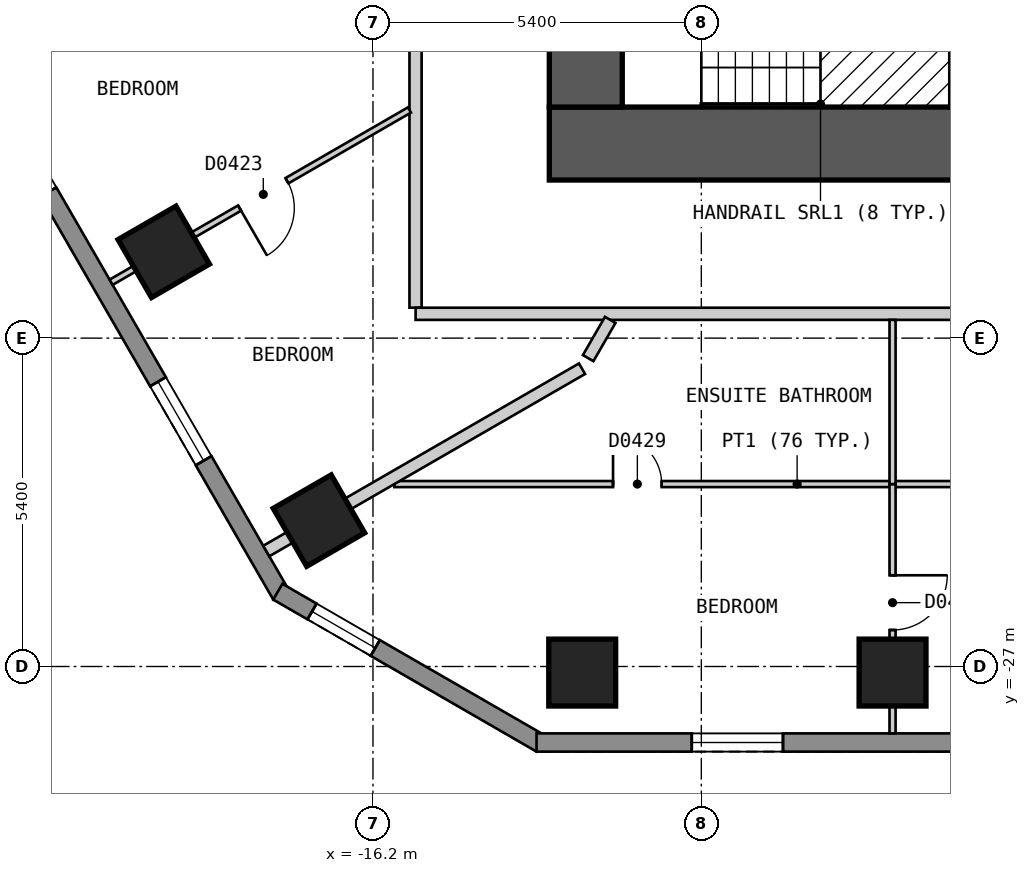
"""IFC4 building model, lengths in metres.
Left out: names, types, materials, properties, quantities, classifications, styles, units other than length and angle.
Written with IfcOpenShell. Run it as: python <this file> out.ifc"""

import sys

from ifc_helpers import new_model, si_unit, direction, frame, frame_2d, origin, origin_2d, place, context, subcontext, project, spatial, polyline, rectangle, outline, extrude, element, fill, save


model = new_model("IFC4")
c1 = context("Model", 3, precision=1e-05, world=origin(), true_north=direction((0.0, 1.0)))
c2 = subcontext(c1, "Body", "Model", "MODEL_VIEW")
j1 = project(units=[si_unit("LENGTHUNIT", "METRE"), si_unit("PLANEANGLEUNIT", "RADIAN")], contexts=[c1])
p1 = place(None, origin())
s1 = spatial("IfcSite", under=j1, at=p1, CompositionType="ELEMENT")
p2 = place(p1, origin())
s2 = spatial("IfcBuilding", under=s1, at=p2, CompositionType="ELEMENT")
p3 = place(p2, frame((0.0, 0.0, 32.4)))
s3 = spatial("IfcBuildingStorey", under=s2, at=p3, CompositionType="ELEMENT", Elevation=32.4)
for number, where, z_axis, x_axis in (
    (1, (-19.641, -20.181, 0.0), (0.0, 0.0, 1.0), (0.5, -0.866, 0.0)),
    (2, (-17.089, -24.601, 0.0), (0.0, 0.0, 1.0), (0.5, -0.866, 0.0)),
    (3, (-12.759, -27.1, 0.0), (0.0, 0.0, 1.0), (1.0, 0.0, 0.0)),
    (4, (-7.655, -27.1, 0.0), (0.0, 0.0, 1.0), (1.0, 0.0, 0.0)),
):
    element("IfcColumn", number, at=place(p3, frame(where, z_axis=z_axis, x_axis=x_axis)), inside=s3, PredefinedType="COLUMN", context=c2, shape_type="SweptSolid", body=[
        extrude(rectangle(XDim=1.1, YDim=1.1, at=origin_2d()), origin(), (0.0, 0.0, 1.0), 3.0),
    ])
p4 = place(p3, frame((-13.3, -18.4, 0.0), z_axis=(0.0, 0.0, 1.0), x_axis=(1.0, 0.0, 0.0)))
e5 = element("IfcWall", 5, at=p4, inside=s3, PredefinedType="SHEAR", context=c2, shape_type="SweptSolid", body=[
    extrude(rectangle(XDim=26.6, YDim=1.2, at=frame_2d((13.3, 0.0))), origin(), (0.0, 0.0, 1.0), 2.7),
])
p5 = place(p3, frame((-12.7, -17.8, 0.0), z_axis=(0.0, 0.0, 1.0), x_axis=(0.0, 1.0, 0.0)))
e6 = element("IfcWall", 6, at=p5, inside=s3, PredefinedType="SHEAR", context=c2, shape_type="SweptSolid", body=[
    extrude(rectangle(XDim=11.6, YDim=1.2, at=frame_2d((5.8, 0.0))), origin(), (0.0, 0.0, 1.0), 2.7),
])
p6 = place(p5, frame((3.6, 0.0, 0.0)))
e7 = element("IfcOpeningElement", 7, at=p6, cuts=e6, PredefinedType="OPENING", context=c2, shape_type="SweptSolid", body=[
    extrude(rectangle(XDim=1.2, YDim=2.1, at=frame_2d((0.6, 1.05))), frame((0.0, 0.61, 0.0), z_axis=(0.0, -1.0, 0.0), x_axis=(1.0, 0.0, 0.0)), (0.0, 0.0, 1.0), 1.22),
])
p7 = place(p3, frame((-31.22, -2.425, 0.0), z_axis=(0.0, 0.0, 1.0), x_axis=(0.500001938803, -0.866024284413, 0.0)))
e8 = element("IfcWall", 8, at=p7, inside=s3, PredefinedType="SOLIDWALL", context=c2, shape_type="SweptSolid", body=[
    extrude(outline(polyline([(0.0, -0.15), (27.02, -0.15), (26.94, 0.15), (0.08, 0.15), (0.0, -0.15)])), origin(), (0.0, 0.0, 1.0), 2.7),
])
p8 = place(p7, frame((2.553, 0.0, 0.15)))
e9 = element("IfcOpeningElement", 9, at=p8, cuts=e8, PredefinedType="OPENING", context=c2, shape_type="SweptSolid", body=[
    extrude(rectangle(XDim=1.5, YDim=2.1, at=frame_2d((0.75, 1.05))), frame((0.0, 0.16, 0.0), z_axis=(0.0, -1.0, 0.0), x_axis=(1.0, 0.0, 0.0)), (0.0, 0.0, 1.0), 0.32),
])
p9 = place(p7, frame((7.657, 0.0, 0.15)))
e10 = element("IfcOpeningElement", 10, at=p9, cuts=e8, PredefinedType="OPENING", context=c2, shape_type="SweptSolid", body=[
    extrude(rectangle(XDim=1.5, YDim=2.1, at=frame_2d((0.75, 1.05))), frame((0.0, 0.16, 0.0), z_axis=(0.0, -1.0, 0.0), x_axis=(1.0, 0.0, 0.0)), (0.0, 0.0, 1.0), 0.32),
])
p10 = place(p7, frame((12.761, 0.0, 0.15)))
e11 = element("IfcOpeningElement", 11, at=p10, cuts=e8, PredefinedType="OPENING", context=c2, shape_type="SweptSolid", body=[
    extrude(rectangle(XDim=1.5, YDim=2.1, at=frame_2d((0.75, 1.05))), frame((0.0, 0.16, 0.0), z_axis=(0.0, -1.0, 0.0), x_axis=(1.0, 0.0, 0.0)), (0.0, 0.0, 1.0), 0.32),
])
p11 = place(p7, frame((17.865, 0.0, 0.15)))
e12 = element("IfcOpeningElement", 12, at=p11, cuts=e8, PredefinedType="OPENING", context=c2, shape_type="SweptSolid", body=[
    extrude(rectangle(XDim=1.5, YDim=2.1, at=frame_2d((0.75, 1.05))), frame((0.0, 0.16, 0.0), z_axis=(0.0, -1.0, 0.0), x_axis=(1.0, 0.0, 0.0)), (0.0, 0.0, 1.0), 0.32),
])
p12 = place(p7, frame((22.969, 0.0, 0.15)))
e13 = element("IfcOpeningElement", 13, at=p12, cuts=e8, PredefinedType="OPENING", context=c2, shape_type="SweptSolid", body=[
    extrude(rectangle(XDim=1.5, YDim=2.1, at=frame_2d((0.75, 1.05))), frame((0.0, 0.16, 0.0), z_axis=(0.0, -1.0, 0.0), x_axis=(1.0, 0.0, 0.0)), (0.0, 0.0, 1.0), 0.32),
])
p13 = place(p3, frame((-17.765, -25.77, 0.0), z_axis=(0.0, 0.0, 1.0), x_axis=(0.866010750942, -0.50002537861, 0.0)))
e14 = element("IfcWall", 14, at=p13, inside=s3, PredefinedType="SOLIDWALL", context=c2, shape_type="SweptSolid", body=[
    extrude(outline(polyline([(0.0, -0.15), (5.0, -0.15), (4.919, 0.15), (0.08, 0.15), (0.0, -0.15)])), origin(), (0.0, 0.0, 1.0), 2.7),
])
p14 = place(p13, frame((0.65, 0.0, 0.15)))
e15 = element("IfcOpeningElement", 15, at=p14, cuts=e14, PredefinedType="OPENING", context=c2, shape_type="SweptSolid", body=[
    extrude(rectangle(XDim=1.2, YDim=2.1, at=frame_2d((0.6, 1.05))), frame((0.0, 0.16, 0.0), z_axis=(0.0, -1.0, 0.0), x_axis=(1.0, 0.0, 0.0)), (0.0, 0.0, 1.0), 0.32),
])
p15 = place(p3, frame((-13.51, -28.25, 0.0), z_axis=(0.0, 0.0, 1.0), x_axis=(1.0, 0.0, 0.0)))
e16 = element("IfcWall", 16, at=p15, inside=s3, PredefinedType="SOLIDWALL", context=c2, shape_type="SweptSolid", body=[
    extrude(outline(polyline([(0.0, -0.15), (27.02, -0.15), (26.94, 0.15), (0.08, 0.15), (0.0, -0.15)])), origin(), (0.0, 0.0, 1.0), 2.7),
])
p16 = place(p15, frame((2.553, 0.0, 0.15)))
e17 = element("IfcOpeningElement", 17, at=p16, cuts=e16, PredefinedType="OPENING", context=c2, shape_type="SweptSolid", body=[
    extrude(rectangle(XDim=1.5, YDim=2.1, at=frame_2d((0.75, 1.05))), frame((0.0, 0.16, 0.0), z_axis=(0.0, -1.0, 0.0), x_axis=(1.0, 0.0, 0.0)), (0.0, 0.0, 1.0), 0.32),
])
p17 = place(p15, frame((7.657, 0.0, 0.15)))
e18 = element("IfcOpeningElement", 18, at=p17, cuts=e16, PredefinedType="OPENING", context=c2, shape_type="SweptSolid", body=[
    extrude(rectangle(XDim=1.5, YDim=2.1, at=frame_2d((0.75, 1.05))), frame((0.0, 0.16, 0.0), z_axis=(0.0, -1.0, 0.0), x_axis=(1.0, 0.0, 0.0)), (0.0, 0.0, 1.0), 0.32),
])
p18 = place(p15, frame((12.761, 0.0, 0.15)))
e19 = element("IfcOpeningElement", 19, at=p18, cuts=e16, PredefinedType="OPENING", context=c2, shape_type="SweptSolid", body=[
    extrude(rectangle(XDim=1.5, YDim=2.1, at=frame_2d((0.75, 1.05))), frame((0.0, 0.16, 0.0), z_axis=(0.0, -1.0, 0.0), x_axis=(1.0, 0.0, 0.0)), (0.0, 0.0, 1.0), 0.32),
])
p19 = place(p15, frame((17.865, 0.0, 0.15)))
e20 = element("IfcOpeningElement", 20, at=p19, cuts=e16, PredefinedType="OPENING", context=c2, shape_type="SweptSolid", body=[
    extrude(rectangle(XDim=1.5, YDim=2.1, at=frame_2d((0.75, 1.05))), frame((0.0, 0.16, 0.0), z_axis=(0.0, -1.0, 0.0), x_axis=(1.0, 0.0, 0.0)), (0.0, 0.0, 1.0), 0.32),
])
p20 = place(p15, frame((22.969, 0.0, 0.15)))
e21 = element("IfcOpeningElement", 21, at=p20, cuts=e16, PredefinedType="OPENING", context=c2, shape_type="SweptSolid", body=[
    extrude(rectangle(XDim=1.5, YDim=2.1, at=frame_2d((0.75, 1.05))), frame((0.0, 0.16, 0.0), z_axis=(0.0, -1.0, 0.0), x_axis=(1.0, 0.0, 0.0)), (0.0, 0.0, 1.0), 0.32),
])
p21 = place(p3, frame((-15.5, -16.5, 0.0), z_axis=(0.0, 0.0, 1.0), x_axis=(0.0, -1.0, 0.0)))
e22 = element("IfcWall", 22, at=p21, inside=s3, PredefinedType="PARTITIONING", context=c2, shape_type="SweptSolid", body=[
    extrude(rectangle(XDim=4.599, YDim=0.2, at=frame_2d((2.3, 0.0))), origin(), (0.0, 0.0, 1.0), 2.7),
])
p22 = place(p3, frame((-15.499, -21.2, 0.0), z_axis=(0.0, 0.0, 1.0), x_axis=(1.0, 0.0, 0.0)))
e23 = element("IfcWall", 23, at=p22, inside=s3, PredefinedType="PARTITIONING", context=c2, shape_type="SweptSolid", body=[
    extrude(rectangle(XDim=30.898, YDim=0.2, at=frame_2d((15.449, 0.0))), origin(), (0.0, 0.0, 1.0), 2.7),
])
p23 = place(p22, frame((15.0, 0.0, 0.0)))
e24 = element("IfcOpeningElement", 24, at=p23, cuts=e23, PredefinedType="OPENING", context=c2, shape_type="SweptSolid", body=[
    extrude(rectangle(XDim=1.0, YDim=2.1, at=frame_2d((0.5, 1.05))), frame((0.0, 0.11, 0.0), z_axis=(0.0, -1.0, 0.0), x_axis=(1.0, 0.0, 0.0)), (0.0, 0.0, 1.0), 0.22),
])
p24 = place(p22, frame((20.104, 0.0, 0.0)))
e25 = element("IfcOpeningElement", 25, at=p24, cuts=e23, PredefinedType="OPENING", context=c2, shape_type="SweptSolid", body=[
    extrude(rectangle(XDim=1.0, YDim=2.1, at=frame_2d((0.5, 1.05))), frame((0.0, 0.11, 0.0), z_axis=(0.0, -1.0, 0.0), x_axis=(1.0, 0.0, 0.0)), (0.0, 0.0, 1.0), 0.22),
])
p25 = place(p3, frame((-15.848, -24.0, 0.0), z_axis=(0.0, 0.0, 1.0), x_axis=(1.0, 0.0, 0.0)))
e26 = element("IfcWall", 26, at=p25, inside=s3, PredefinedType="PARTITIONING", context=c2, shape_type="SweptSolid", body=[
    extrude(rectangle(XDim=13.247, YDim=0.1, at=frame_2d((6.624, 0.0))), origin(), (0.0, 0.0, 1.0), 2.7),
])
p26 = place(p25, frame((3.596, 0.0, 0.0)))
e27 = element("IfcOpeningElement", 27, at=p26, cuts=e26, PredefinedType="OPENING", context=c2, shape_type="SweptSolid", body=[
    extrude(rectangle(XDim=0.8, YDim=2.1, at=frame_2d((0.4, 1.05))), frame((0.0, 0.06, 0.0), z_axis=(0.0, -1.0, 0.0), x_axis=(1.0, 0.0, 0.0)), (0.0, 0.0, 1.0), 0.12),
])
p27 = place(p25, frame((10.345, 0.0, 0.0)))
e28 = element("IfcOpeningElement", 28, at=p27, cuts=e26, PredefinedType="OPENING", context=c2, shape_type="SweptSolid", body=[
    extrude(rectangle(XDim=0.8, YDim=2.1, at=frame_2d((0.4, 1.05))), frame((0.0, 0.06, 0.0), z_axis=(0.0, -1.0, 0.0), x_axis=(1.0, 0.0, 0.0)), (0.0, 0.0, 1.0), 0.12),
])
p28 = place(p3, frame((-7.655, -28.1, 0.0), z_axis=(0.0, 0.0, 1.0), x_axis=(0.0, 1.0, 0.0)))
e29 = element("IfcWall", 29, at=p28, inside=s3, PredefinedType="PARTITIONING", context=c2, shape_type="SweptSolid", body=[
    extrude(rectangle(XDim=4.1, YDim=0.1, at=frame_2d((2.05, 0.0))), origin(), (0.0, 0.0, 1.0), 2.7),
])
p29 = place(p28, frame((1.7, 0.0, 0.0)))
e30 = element("IfcOpeningElement", 30, at=p29, cuts=e29, PredefinedType="OPENING", context=c2, shape_type="SweptSolid", body=[
    extrude(rectangle(XDim=0.9, YDim=2.1, at=frame_2d((0.45, 1.05))), frame((0.0, 0.06, 0.0), z_axis=(0.0, -1.0, 0.0), x_axis=(1.0, 0.0, 0.0)), (0.0, 0.0, 1.0), 0.12),
])
p30 = place(p3, frame((-20.507, -20.681, 0.0), z_axis=(0.0, 0.0, 1.0), x_axis=(0.866028446103, 0.499994730513, 0.0)))
e31 = element("IfcWall", 31, at=p30, inside=s3, PredefinedType="PARTITIONING", context=c2, shape_type="SweptSolid", body=[
    extrude(rectangle(XDim=5.666, YDim=0.1, at=frame_2d((2.833, 0.0))), origin(), (0.0, 0.0, 1.0), 2.7),
])
p31 = place(p30, frame((2.44, 0.0, 0.0)))
e32 = element("IfcOpeningElement", 32, at=p31, cuts=e31, PredefinedType="OPENING", context=c2, shape_type="SweptSolid", body=[
    extrude(rectangle(XDim=0.9, YDim=2.1, at=frame_2d((0.45, 1.05))), frame((0.0, 0.06, 0.0), z_axis=(0.0, -1.0, 0.0), x_axis=(1.0, 0.0, 0.0)), (0.0, 0.0, 1.0), 0.12),
])
p32 = place(p3, frame((-12.661, -21.929, 0.0), z_axis=(0.0, 0.0, 1.0), x_axis=(0.499683639304, 0.866207977689, 0.0)))
e33 = element("IfcWall", 33, at=p32, inside=s3, PredefinedType="PARTITIONING", context=c2, shape_type="SweptSolid", body=[
    extrude(rectangle(XDim=0.726, YDim=0.2, at=frame_2d((0.363, 0.0))), origin(), (0.0, 0.0, 1.0), 2.7),
])
p33 = place(p3, frame((-17.955, -25.101, 0.0), z_axis=(0.0, 0.0, 1.0), x_axis=(0.866039817231, 0.499975034347, 0.0)))
e34 = element("IfcWall", 34, at=p33, inside=s3, PredefinedType="PARTITIONING", context=c2, shape_type="SweptSolid", body=[
    extrude(rectangle(XDim=5.996, YDim=0.2, at=frame_2d((2.998, 0.0))), origin(), (0.0, 0.0, 1.0), 2.7),
])
p34 = place(p3, frame((-7.655, -24.0, 0.0), z_axis=(0.0, 0.0, 1.0), x_axis=(0.0, 1.0, 0.0)))
e35 = element("IfcWall", 35, at=p34, inside=s3, PredefinedType="PARTITIONING", context=c2, shape_type="SweptSolid", body=[
    extrude(rectangle(XDim=2.7, YDim=0.1, at=frame_2d((1.35, 0.0))), origin(), (0.0, 0.0, 1.0), 2.7),
])
p35 = place(p12, origin())
e36 = element("IfcWindow", 36, at=p35, inside=s3, PartitioningType="SINGLE_PANEL", PredefinedType="WINDOW", context=c2, shape_type="SweptSolid", body=[
    extrude(rectangle(XDim=1.5, YDim=2.1, at=frame_2d((0.75, 1.05))), frame((0.0, 0.03, 0.0), z_axis=(0.0, -1.0, 0.0), x_axis=(1.0, 0.0, 0.0)), (0.0, 0.0, 1.0), 0.06),
])
fill(e13, e36)
p36 = place(p14, origin())
e37 = element("IfcWindow", 37, at=p36, inside=s3, PartitioningType="SINGLE_PANEL", PredefinedType="WINDOW", context=c2, shape_type="SweptSolid", body=[
    extrude(rectangle(XDim=1.2, YDim=2.1, at=frame_2d((0.6, 1.05))), frame((0.0, 0.03, 0.0), z_axis=(0.0, -1.0, 0.0), x_axis=(1.0, 0.0, 0.0)), (0.0, 0.0, 1.0), 0.06),
])
fill(e15, e37)
p37 = place(p16, origin())
e38 = element("IfcWindow", 38, at=p37, inside=s3, PartitioningType="SINGLE_PANEL", PredefinedType="WINDOW", context=c2, shape_type="SweptSolid", body=[
    extrude(rectangle(XDim=1.5, YDim=2.1, at=frame_2d((0.75, 1.05))), frame((0.0, 0.03, 0.0), z_axis=(0.0, -1.0, 0.0), x_axis=(1.0, 0.0, 0.0)), (0.0, 0.0, 1.0), 0.06),
])
fill(e17, e38)
p38 = place(p31, origin())
e39 = element("IfcDoor", 39, at=p38, inside=s3, OperationType="SINGLE_SWING_LEFT", PredefinedType="DOOR", context=c2, shape_type="SweptSolid", body=[
    extrude(rectangle(XDim=0.9, YDim=2.1, at=frame_2d((0.45, 1.05))), frame((0.0, 0.025, 0.0), z_axis=(0.0, -1.0, 0.0), x_axis=(1.0, 0.0, 0.0)), (0.0, 0.0, 1.0), 0.05),
])
fill(e32, e39)
p39 = place(p29, origin())
e40 = element("IfcDoor", 40, at=p39, inside=s3, OperationType="SINGLE_SWING_RIGHT", PredefinedType="DOOR", context=c2, shape_type="SweptSolid", body=[
    extrude(rectangle(XDim=0.9, YDim=2.1, at=frame_2d((0.45, 1.05))), frame((0.0, 0.025, 0.0), z_axis=(0.0, -1.0, 0.0), x_axis=(1.0, 0.0, 0.0)), (0.0, 0.0, 1.0), 0.05),
])
fill(e30, e40)
p40 = place(p26, origin())
e41 = element("IfcDoor", 41, at=p40, inside=s3, OperationType="SINGLE_SWING_LEFT", PredefinedType="DOOR", context=c2, shape_type="SweptSolid", body=[
    extrude(rectangle(XDim=0.8, YDim=2.1, at=frame_2d((0.4, 1.05))), frame((0.0, 0.025, 0.0), z_axis=(0.0, -1.0, 0.0), x_axis=(1.0, 0.0, 0.0)), (0.0, 0.0, 1.0), 0.05),
])
fill(e27, e41)
save(model, sys.argv[1])
